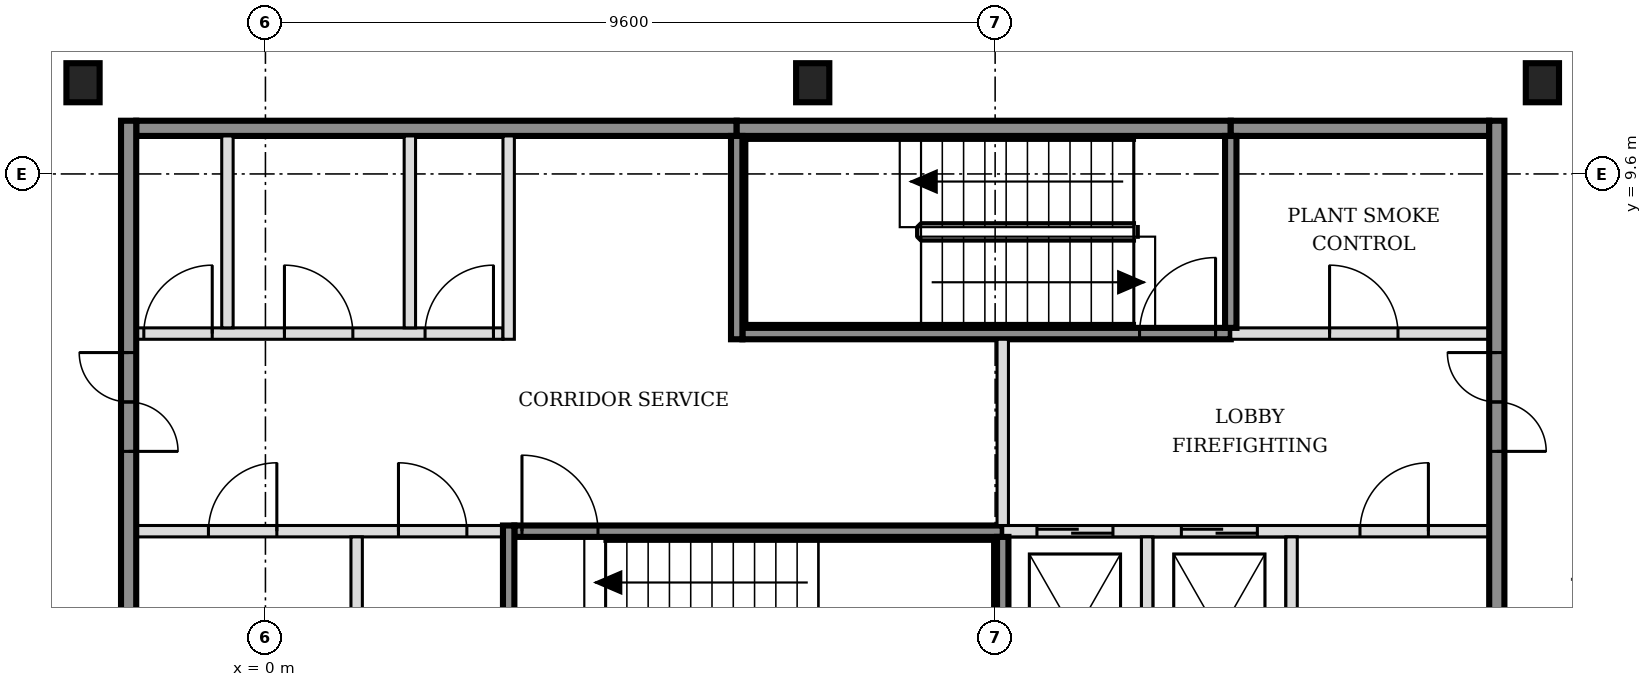
"""IFC4 building model, lengths in metres.
Left out: names, types, materials, properties, quantities, classifications, styles, units other than length and angle.
Written with IfcOpenShell. Run it as: python <this file> out.ifc"""

import sys

from ifc_helpers import new_model, si_unit, direction, frame, frame_2d, origin, origin_2d, place, context, subcontext, project, spatial, rectangle, i_section, extrude, element, fill, save


model = new_model("IFC4")
c1 = context("Model", 3, precision=1e-05, world=origin(), true_north=direction((0.0, 1.0)))
c2 = subcontext(c1, "Body", "Model", "MODEL_VIEW")
j1 = project(units=[si_unit("LENGTHUNIT", "METRE"), si_unit("PLANEANGLEUNIT", "RADIAN")], contexts=[c1])
p1 = place(None, origin())
s1 = spatial("IfcSite", under=j1, at=p1, CompositionType="ELEMENT")
p2 = place(p1, origin())
s2 = spatial("IfcBuilding", under=s1, at=p2, CompositionType="ELEMENT")
p3 = place(p2, frame((0.0, 0.0, 65.4)))
s3 = spatial("IfcBuildingStorey", under=s2, at=p3, CompositionType="ELEMENT", Elevation=65.4)
for number, where, z_axis, x_axis in (
    (1, (-2.4, 10.8, -0.15), (0.0, 0.0, 1.0), (1.0, 0.0, 0.0)),
    (2, (7.2, 10.8, -0.15), (0.0, 0.0, 1.0), (1.0, 0.0, 0.0)),
    (3, (16.8, 10.8, -0.15), (0.0, 0.0, 1.0), (1.0, 0.0, 0.0)),
):
    element("IfcColumn", number, at=place(p3, frame(where, z_axis=z_axis, x_axis=x_axis)), inside=s3, PredefinedType="COLUMN", context=c2, shape_type="SweptSolid", body=[
        extrude(i_section(OverallWidth=0.437, OverallDepth=0.514, WebThickness=0.061, FlangeThickness=0.097, FilletRadius=0.015, at=origin_2d()), origin(), (0.0, 0.0, 1.0), 3.6),
    ])
p4 = place(p3, frame((-1.7, 4.9, 0.0), z_axis=(0.0, 0.0, 1.0), x_axis=(1.0, 0.0, 0.0)))
e4 = element("IfcWall", 4, at=p4, inside=s3, PredefinedType="PARTITIONING", context=c2, shape_type="SweptSolid", body=[
    extrude(rectangle(XDim=4.825, YDim=0.15, at=frame_2d((2.413, 0.0))), origin(), (0.0, 0.0, 1.0), 3.45),
])
p5 = place(p4, frame((0.95, 0.0, 0.0)))
e5 = element("IfcOpeningElement", 5, at=p5, cuts=e4, PredefinedType="OPENING", context=c2, shape_type="SweptSolid", body=[
    extrude(rectangle(XDim=0.9, YDim=2.1, at=frame_2d((0.45, 1.05))), frame((0.0, 0.085, 0.0), z_axis=(0.0, -1.0, 0.0), x_axis=(1.0, 0.0, 0.0)), (0.0, 0.0, 1.0), 0.17),
])
p6 = place(p4, frame((3.45, 0.0, 0.0)))
e6 = element("IfcOpeningElement", 6, at=p6, cuts=e4, PredefinedType="OPENING", context=c2, shape_type="SweptSolid", body=[
    extrude(rectangle(XDim=0.9, YDim=2.1, at=frame_2d((0.45, 1.05))), frame((0.0, 0.085, 0.0), z_axis=(0.0, -1.0, 0.0), x_axis=(1.0, 0.0, 0.0)), (0.0, 0.0, 1.0), 0.17),
])
p7 = place(p3, frame((3.275, 4.9, 0.0), z_axis=(0.0, 0.0, 1.0), x_axis=(1.0, 0.0, 0.0)))
e7 = element("IfcWall", 7, at=p7, inside=s3, PredefinedType="SOLIDWALL", context=c2, shape_type="SweptSolid", body=[
    extrude(rectangle(XDim=6.425, YDim=0.15, at=frame_2d((3.212, 0.0))), origin(), (0.0, 0.0, 1.0), 3.45),
])
p8 = place(p7, frame((0.1, 0.0, 0.0)))
e8 = element("IfcOpeningElement", 8, at=p8, cuts=e7, PredefinedType="OPENING", context=c2, shape_type="SweptSolid", body=[
    extrude(rectangle(XDim=1.0, YDim=2.1, at=frame_2d((0.5, 1.05))), frame((0.0, 0.085, 0.0), z_axis=(0.0, -1.0, 0.0), x_axis=(1.0, 0.0, 0.0)), (0.0, 0.0, 1.0), 0.17),
])
p9 = place(p3, frame((9.7, 4.9, 0.0), z_axis=(0.0, 0.0, 1.0), x_axis=(1.0, 0.0, 0.0)))
e9 = element("IfcWall", 9, at=p9, inside=s3, PredefinedType="SOLIDWALL", context=c2, shape_type="SweptSolid", body=[
    extrude(rectangle(XDim=6.4, YDim=0.15, at=frame_2d((3.2, 0.0))), origin(), (0.0, 0.0, 1.0), 3.45),
])
p10 = place(p9, frame((0.45, 0.0, 0.0)))
e10 = element("IfcOpeningElement", 10, at=p10, cuts=e9, PredefinedType="OPENING", context=c2, shape_type="SweptSolid", body=[
    extrude(rectangle(XDim=1.0, YDim=2.1, at=frame_2d((0.5, 1.05))), frame((0.0, 0.085, 0.0), z_axis=(0.0, -1.0, 0.0), x_axis=(1.0, 0.0, 0.0)), (0.0, 0.0, 1.0), 0.17),
])
p11 = place(p9, frame((2.35, 0.0, 0.0)))
e11 = element("IfcOpeningElement", 11, at=p11, cuts=e9, PredefinedType="OPENING", context=c2, shape_type="SweptSolid", body=[
    extrude(rectangle(XDim=1.0, YDim=2.1, at=frame_2d((0.5, 1.05))), frame((0.0, 0.085, 0.0), z_axis=(0.0, -1.0, 0.0), x_axis=(1.0, 0.0, 0.0)), (0.0, 0.0, 1.0), 0.17),
])
p12 = place(p9, frame((4.7, 0.0, 0.0)))
e12 = element("IfcOpeningElement", 12, at=p12, cuts=e9, PredefinedType="OPENING", context=c2, shape_type="SweptSolid", body=[
    extrude(rectangle(XDim=0.9, YDim=2.1, at=frame_2d((0.45, 1.05))), frame((0.0, 0.085, 0.0), z_axis=(0.0, -1.0, 0.0), x_axis=(1.0, 0.0, 0.0)), (0.0, 0.0, 1.0), 0.17),
])
p13 = place(p3, frame((-1.7, 7.5, 0.0), z_axis=(0.0, 0.0, 1.0), x_axis=(1.0, 0.0, 0.0)))
e13 = element("IfcWall", 13, at=p13, inside=s3, PredefinedType="PARTITIONING", context=c2, shape_type="SweptSolid", body=[
    extrude(rectangle(XDim=4.825, YDim=0.15, at=frame_2d((2.413, 0.0))), origin(), (0.0, 0.0, 1.0), 3.45),
])
p14 = place(p13, frame((0.1, 0.0, 0.0)))
e14 = element("IfcOpeningElement", 14, at=p14, cuts=e13, PredefinedType="OPENING", context=c2, shape_type="SweptSolid", body=[
    extrude(rectangle(XDim=0.9, YDim=2.1, at=frame_2d((0.45, 1.05))), frame((0.0, 0.085, 0.0), z_axis=(0.0, -1.0, 0.0), x_axis=(1.0, 0.0, 0.0)), (0.0, 0.0, 1.0), 0.17),
])
p15 = place(p13, frame((1.95, 0.0, 0.0)))
e15 = element("IfcOpeningElement", 15, at=p15, cuts=e13, PredefinedType="OPENING", context=c2, shape_type="SweptSolid", body=[
    extrude(rectangle(XDim=0.9, YDim=2.1, at=frame_2d((0.45, 1.05))), frame((0.0, 0.085, 0.0), z_axis=(0.0, -1.0, 0.0), x_axis=(1.0, 0.0, 0.0)), (0.0, 0.0, 1.0), 0.17),
])
p16 = place(p13, frame((3.8, 0.0, 0.0)))
e16 = element("IfcOpeningElement", 16, at=p16, cuts=e13, PredefinedType="OPENING", context=c2, shape_type="SweptSolid", body=[
    extrude(rectangle(XDim=0.9, YDim=2.1, at=frame_2d((0.45, 1.05))), frame((0.0, 0.085, 0.0), z_axis=(0.0, -1.0, 0.0), x_axis=(1.0, 0.0, 0.0)), (0.0, 0.0, 1.0), 0.17),
])
p17 = place(p3, frame((6.275, 7.5, 0.0), z_axis=(0.0, 0.0, 1.0), x_axis=(1.0, 0.0, 0.0)))
e17 = element("IfcWall", 17, at=p17, inside=s3, PredefinedType="SOLIDWALL", context=c2, shape_type="SweptSolid", body=[
    extrude(rectangle(XDim=6.425, YDim=0.15, at=frame_2d((3.212, 0.0))), origin(), (0.0, 0.0, 1.0), 3.45),
])
p18 = place(p17, frame((5.225, 0.0, 0.0)))
e18 = element("IfcOpeningElement", 18, at=p18, cuts=e17, PredefinedType="OPENING", context=c2, shape_type="SweptSolid", body=[
    extrude(rectangle(XDim=1.0, YDim=2.1, at=frame_2d((0.5, 1.05))), frame((0.0, 0.085, 0.0), z_axis=(0.0, -1.0, 0.0), x_axis=(1.0, 0.0, 0.0)), (0.0, 0.0, 1.0), 0.17),
])
p19 = place(p3, frame((12.7, 7.5, 0.0), z_axis=(0.0, 0.0, 1.0), x_axis=(1.0, 0.0, 0.0)))
e19 = element("IfcWall", 19, at=p19, inside=s3, PredefinedType="SOLIDWALL", context=c2, shape_type="SweptSolid", body=[
    extrude(rectangle(XDim=3.4, YDim=0.15, at=frame_2d((1.7, 0.0))), origin(), (0.0, 0.0, 1.0), 3.45),
])
p20 = place(p19, frame((1.3, 0.0, 0.0)))
e20 = element("IfcOpeningElement", 20, at=p20, cuts=e19, PredefinedType="OPENING", context=c2, shape_type="SweptSolid", body=[
    extrude(rectangle(XDim=0.9, YDim=2.1, at=frame_2d((0.45, 1.05))), frame((0.0, 0.085, 0.0), z_axis=(0.0, -1.0, 0.0), x_axis=(1.0, 0.0, 0.0)), (0.0, 0.0, 1.0), 0.17),
])
p21 = place(p3, frame((-1.7, 10.2, 0.0), z_axis=(0.0, 0.0, 1.0), x_axis=(1.0, 0.0, 0.0)))
e21 = element("IfcWall", 21, at=p21, inside=s3, PredefinedType="SOLIDWALL", context=c2, shape_type="SweptSolid", body=[
    extrude(rectangle(XDim=7.9, YDim=0.2, at=frame_2d((3.95, 0.0))), origin(), (0.0, 0.0, 1.0), 3.45),
])
p22 = place(p3, frame((6.2, 10.2, 0.0), z_axis=(0.0, 0.0, 1.0), x_axis=(1.0, 0.0, 0.0)))
e22 = element("IfcWall", 22, at=p22, inside=s3, PredefinedType="SOLIDWALL", context=c2, shape_type="SweptSolid", body=[
    extrude(rectangle(XDim=6.5, YDim=0.2, at=frame_2d((3.25, 0.0))), origin(), (0.0, 0.0, 1.0), 3.45),
])
p23 = place(p3, frame((12.7, 10.2, 0.0), z_axis=(0.0, 0.0, 1.0), x_axis=(1.0, 0.0, 0.0)))
e23 = element("IfcWall", 23, at=p23, inside=s3, PredefinedType="SOLIDWALL", context=c2, shape_type="SweptSolid", body=[
    extrude(rectangle(XDim=3.4, YDim=0.2, at=frame_2d((1.7, 0.0))), origin(), (0.0, 0.0, 1.0), 3.45),
])
p24 = place(p3, frame((-1.8, -5.5, 0.0), z_axis=(0.0, 0.0, 1.0), x_axis=(0.0, 1.0, 0.0)))
e24 = element("IfcWall", 24, at=p24, inside=s3, PredefinedType="SOLIDWALL", context=c2, shape_type="SweptSolid", body=[
    extrude(rectangle(XDim=15.8, YDim=0.2, at=frame_2d((7.9, 0.0))), origin(), (0.0, 0.0, 1.0), 3.45),
])
p25 = place(p24, frame((3.05, 0.0, 0.0)))
e25 = element("IfcOpeningElement", 25, at=p25, cuts=e24, PredefinedType="OPENING", context=c2, shape_type="SweptSolid", body=[
    extrude(rectangle(XDim=1.3, YDim=2.1, at=frame_2d((0.65, 1.05))), frame((0.0, 0.11, 0.0), z_axis=(0.0, -1.0, 0.0), x_axis=(1.0, 0.0, 0.0)), (0.0, 0.0, 1.0), 0.22),
])
p26 = place(p24, frame((11.45, 0.0, 0.0)))
e26 = element("IfcOpeningElement", 26, at=p26, cuts=e24, PredefinedType="OPENING", context=c2, shape_type="SweptSolid", body=[
    extrude(rectangle(XDim=1.3, YDim=2.1, at=frame_2d((0.65, 1.05))), frame((0.0, 0.11, 0.0), z_axis=(0.0, -1.0, 0.0), x_axis=(1.0, 0.0, 0.0)), (0.0, 0.0, 1.0), 0.22),
])
p27 = place(p3, frame((-0.5, 7.575, 0.0), z_axis=(0.0, 0.0, 1.0), x_axis=(0.0, 1.0, 0.0)))
e27 = element("IfcWall", 27, at=p27, inside=s3, PredefinedType="PARTITIONING", context=c2, shape_type="SweptSolid", body=[
    extrude(rectangle(XDim=2.525, YDim=0.15, at=frame_2d((1.263, 0.0))), origin(), (0.0, 0.0, 1.0), 3.45),
])
p28 = place(p3, frame((1.2, 2.275, 0.0), z_axis=(0.0, 0.0, 1.0), x_axis=(0.0, 1.0, 0.0)))
e28 = element("IfcWall", 28, at=p28, inside=s3, PredefinedType="PARTITIONING", context=c2, shape_type="SweptSolid", body=[
    extrude(rectangle(XDim=2.55, YDim=0.15, at=frame_2d((1.275, 0.0))), origin(), (0.0, 0.0, 1.0), 3.45),
])
p29 = place(p3, frame((1.9, 7.575, 0.0), z_axis=(0.0, 0.0, 1.0), x_axis=(0.0, 1.0, 0.0)))
e29 = element("IfcWall", 29, at=p29, inside=s3, PredefinedType="PARTITIONING", context=c2, shape_type="SweptSolid", body=[
    extrude(rectangle(XDim=2.525, YDim=0.15, at=frame_2d((1.263, 0.0))), origin(), (0.0, 0.0, 1.0), 3.45),
])
p30 = place(p3, frame((3.2, 2.275, 0.0), z_axis=(0.0, 0.0, 1.0), x_axis=(0.0, 1.0, 0.0)))
e30 = element("IfcWall", 30, at=p30, inside=s3, PredefinedType="SOLIDWALL", context=c2, shape_type="SweptSolid", body=[
    extrude(rectangle(XDim=2.7, YDim=0.15, at=frame_2d((1.35, 0.0))), origin(), (0.0, 0.0, 1.0), 3.45),
])
p31 = place(p3, frame((3.2, 7.425, 0.0), z_axis=(0.0, 0.0, 1.0), x_axis=(0.0, 1.0, 0.0)))
e31 = element("IfcWall", 31, at=p31, inside=s3, PredefinedType="PARTITIONING", context=c2, shape_type="SweptSolid", body=[
    extrude(rectangle(XDim=2.675, YDim=0.15, at=frame_2d((1.337, 0.0))), origin(), (0.0, 0.0, 1.0), 3.45),
])
p32 = place(p3, frame((6.2, 7.425, 0.0), z_axis=(0.0, 0.0, 1.0), x_axis=(0.0, 1.0, 0.0)))
e32 = element("IfcWall", 32, at=p32, inside=s3, PredefinedType="SOLIDWALL", context=c2, shape_type="SweptSolid", body=[
    extrude(rectangle(XDim=2.675, YDim=0.15, at=frame_2d((1.337, 0.0))), origin(), (0.0, 0.0, 1.0), 3.45),
])
p33 = place(p3, frame((9.7, 2.275, 0.0), z_axis=(0.0, 0.0, 1.0), x_axis=(0.0, 1.0, 0.0)))
e33 = element("IfcWall", 33, at=p33, inside=s3, PredefinedType="SOLIDWALL", context=c2, shape_type="SweptSolid", body=[
    extrude(rectangle(XDim=2.55, YDim=0.15, at=frame_2d((1.275, 0.0))), origin(), (0.0, 0.0, 1.0), 3.45),
])
p34 = place(p3, frame((9.7, 4.975, 0.0), z_axis=(0.0, 0.0, 1.0), x_axis=(0.0, 1.0, 0.0)))
e34 = element("IfcWall", 34, at=p34, inside=s3, PredefinedType="SOLIDWALL", context=c2, shape_type="SweptSolid", body=[
    extrude(rectangle(XDim=2.45, YDim=0.15, at=frame_2d((1.225, 0.0))), origin(), (0.0, 0.0, 1.0), 3.45),
])
p35 = place(p3, frame((11.6, 2.275, 0.0), z_axis=(0.0, 0.0, 1.0), x_axis=(0.0, 1.0, 0.0)))
e35 = element("IfcWall", 35, at=p35, inside=s3, PredefinedType="SOLIDWALL", context=c2, shape_type="SweptSolid", body=[
    extrude(rectangle(XDim=2.55, YDim=0.15, at=frame_2d((1.275, 0.0))), origin(), (0.0, 0.0, 1.0), 3.45),
])
p36 = place(p3, frame((12.7, 7.575, 0.0), z_axis=(0.0, 0.0, 1.0), x_axis=(0.0, 1.0, 0.0)))
e36 = element("IfcWall", 36, at=p36, inside=s3, PredefinedType="SOLIDWALL", context=c2, shape_type="SweptSolid", body=[
    extrude(rectangle(XDim=2.525, YDim=0.15, at=frame_2d((1.263, 0.0))), origin(), (0.0, 0.0, 1.0), 3.45),
])
p37 = place(p3, frame((13.5, 2.275, 0.0), z_axis=(0.0, 0.0, 1.0), x_axis=(0.0, 1.0, 0.0)))
e37 = element("IfcWall", 37, at=p37, inside=s3, PredefinedType="SOLIDWALL", context=c2, shape_type="SweptSolid", body=[
    extrude(rectangle(XDim=2.55, YDim=0.15, at=frame_2d((1.275, 0.0))), origin(), (0.0, 0.0, 1.0), 3.45),
])
p38 = place(p3, frame((16.2, -5.5, 0.0), z_axis=(0.0, 0.0, 1.0), x_axis=(0.0, 1.0, 0.0)))
e38 = element("IfcWall", 38, at=p38, inside=s3, PredefinedType="SOLIDWALL", context=c2, shape_type="SweptSolid", body=[
    extrude(rectangle(XDim=15.8, YDim=0.2, at=frame_2d((7.9, 0.0))), origin(), (0.0, 0.0, 1.0), 3.45),
])
p39 = place(p38, frame((3.05, 0.0, 0.0)))
e39 = element("IfcOpeningElement", 39, at=p39, cuts=e38, PredefinedType="OPENING", context=c2, shape_type="SweptSolid", body=[
    extrude(rectangle(XDim=1.3, YDim=2.1, at=frame_2d((0.65, 1.05))), frame((0.0, 0.11, 0.0), z_axis=(0.0, -1.0, 0.0), x_axis=(1.0, 0.0, 0.0)), (0.0, 0.0, 1.0), 0.22),
])
p40 = place(p38, frame((11.45, 0.0, 0.0)))
e40 = element("IfcOpeningElement", 40, at=p40, cuts=e38, PredefinedType="OPENING", context=c2, shape_type="SweptSolid", body=[
    extrude(rectangle(XDim=1.3, YDim=2.1, at=frame_2d((0.65, 1.05))), frame((0.0, 0.11, 0.0), z_axis=(0.0, -1.0, 0.0), x_axis=(1.0, 0.0, 0.0)), (0.0, 0.0, 1.0), 0.22),
])
p41 = place(p10, origin())
e41 = element("IfcDoor", 41, at=p41, inside=s3, OperationType="DOUBLE_DOOR_SLIDING", PredefinedType="DOOR", context=c2, shape_type="SweptSolid", body=[
    extrude(rectangle(XDim=1.0, YDim=2.1, at=frame_2d((0.5, 1.05))), frame((0.0, 0.025, 0.0), z_axis=(0.0, -1.0, 0.0), x_axis=(1.0, 0.0, 0.0)), (0.0, 0.0, 1.0), 0.05),
])
fill(e10, e41)
p42 = place(p11, origin())
e42 = element("IfcDoor", 42, at=p42, inside=s3, OperationType="DOUBLE_DOOR_SLIDING", PredefinedType="DOOR", context=c2, shape_type="SweptSolid", body=[
    extrude(rectangle(XDim=1.0, YDim=2.1, at=frame_2d((0.5, 1.05))), frame((0.0, 0.025, 0.0), z_axis=(0.0, -1.0, 0.0), x_axis=(1.0, 0.0, 0.0)), (0.0, 0.0, 1.0), 0.05),
])
fill(e11, e42)
p43 = place(p8, origin())
e43 = element("IfcDoor", 43, at=p43, inside=s3, OperationType="SINGLE_SWING_LEFT", PredefinedType="DOOR", context=c2, shape_type="SweptSolid", body=[
    extrude(rectangle(XDim=1.0, YDim=2.1, at=frame_2d((0.5, 1.05))), frame((0.0, 0.025, 0.0), z_axis=(0.0, -1.0, 0.0), x_axis=(1.0, 0.0, 0.0)), (0.0, 0.0, 1.0), 0.05),
])
fill(e8, e43)
p44 = place(p18, origin())
e44 = element("IfcDoor", 44, at=p44, inside=s3, OperationType="SINGLE_SWING_RIGHT", PredefinedType="DOOR", context=c2, shape_type="SweptSolid", body=[
    extrude(rectangle(XDim=1.0, YDim=2.1, at=frame_2d((0.5, 1.05))), frame((0.0, 0.025, 0.0), z_axis=(0.0, -1.0, 0.0), x_axis=(1.0, 0.0, 0.0)), (0.0, 0.0, 1.0), 0.05),
])
fill(e18, e44)
p45 = place(p26, origin())
e45 = element("IfcDoor", 45, at=p45, inside=s3, OperationType="DOUBLE_DOOR_SINGLE_SWING", PredefinedType="DOOR", context=c2, shape_type="SweptSolid", body=[
    extrude(rectangle(XDim=1.3, YDim=2.1, at=frame_2d((0.65, 1.05))), frame((0.0, 0.025, 0.0), z_axis=(0.0, -1.0, 0.0), x_axis=(1.0, 0.0, 0.0)), (0.0, 0.0, 1.0), 0.05),
])
fill(e26, e45)
p46 = place(p40, origin())
e46 = element("IfcDoor", 46, at=p46, inside=s3, OperationType="DOUBLE_DOOR_SINGLE_SWING", PredefinedType="DOOR", context=c2, shape_type="SweptSolid", body=[
    extrude(rectangle(XDim=1.3, YDim=2.1, at=frame_2d((0.65, 1.05))), frame((0.0, 0.025, 0.0), z_axis=(0.0, -1.0, 0.0), x_axis=(1.0, 0.0, 0.0)), (0.0, 0.0, 1.0), 0.05),
])
fill(e40, e46)
p47 = place(p12, origin())
e47 = element("IfcDoor", 47, at=p47, inside=s3, OperationType="SINGLE_SWING_RIGHT", PredefinedType="DOOR", context=c2, shape_type="SweptSolid", body=[
    extrude(rectangle(XDim=0.9, YDim=2.1, at=frame_2d((0.45, 1.05))), frame((0.0, 0.025, 0.0), z_axis=(0.0, -1.0, 0.0), x_axis=(1.0, 0.0, 0.0)), (0.0, 0.0, 1.0), 0.05),
])
fill(e12, e47)
p48 = place(p20, origin())
e48 = element("IfcDoor", 48, at=p48, inside=s3, OperationType="SINGLE_SWING_LEFT", PredefinedType="DOOR", context=c2, shape_type="SweptSolid", body=[
    extrude(rectangle(XDim=0.9, YDim=2.1, at=frame_2d((0.45, 1.05))), frame((0.0, 0.025, 0.0), z_axis=(0.0, -1.0, 0.0), x_axis=(1.0, 0.0, 0.0)), (0.0, 0.0, 1.0), 0.05),
])
fill(e20, e48)
p49 = place(p5, origin())
e49 = element("IfcDoor", 49, at=p49, inside=s3, OperationType="SINGLE_SWING_RIGHT", PredefinedType="DOOR", context=c2, shape_type="SweptSolid", body=[
    extrude(rectangle(XDim=0.9, YDim=2.1, at=frame_2d((0.45, 1.05))), frame((0.0, 0.025, 0.0), z_axis=(0.0, -1.0, 0.0), x_axis=(1.0, 0.0, 0.0)), (0.0, 0.0, 1.0), 0.05),
])
fill(e5, e49)
p50 = place(p6, origin())
e50 = element("IfcDoor", 50, at=p50, inside=s3, OperationType="SINGLE_SWING_LEFT", PredefinedType="DOOR", context=c2, shape_type="SweptSolid", body=[
    extrude(rectangle(XDim=0.9, YDim=2.1, at=frame_2d((0.45, 1.05))), frame((0.0, 0.025, 0.0), z_axis=(0.0, -1.0, 0.0), x_axis=(1.0, 0.0, 0.0)), (0.0, 0.0, 1.0), 0.05),
])
fill(e6, e50)
p51 = place(p14, origin())
e51 = element("IfcDoor", 51, at=p51, inside=s3, OperationType="SINGLE_SWING_RIGHT", PredefinedType="DOOR", context=c2, shape_type="SweptSolid", body=[
    extrude(rectangle(XDim=0.9, YDim=2.1, at=frame_2d((0.45, 1.05))), frame((0.0, 0.025, 0.0), z_axis=(0.0, -1.0, 0.0), x_axis=(1.0, 0.0, 0.0)), (0.0, 0.0, 1.0), 0.05),
])
fill(e14, e51)
p52 = place(p15, origin())
e52 = element("IfcDoor", 52, at=p52, inside=s3, OperationType="SINGLE_SWING_LEFT", PredefinedType="DOOR", context=c2, shape_type="SweptSolid", body=[
    extrude(rectangle(XDim=0.9, YDim=2.1, at=frame_2d((0.45, 1.05))), frame((0.0, 0.025, 0.0), z_axis=(0.0, -1.0, 0.0), x_axis=(1.0, 0.0, 0.0)), (0.0, 0.0, 1.0), 0.05),
])
fill(e15, e52)
p53 = place(p16, origin())
e53 = element("IfcDoor", 53, at=p53, inside=s3, OperationType="SINGLE_SWING_RIGHT", PredefinedType="DOOR", context=c2, shape_type="SweptSolid", body=[
    extrude(rectangle(XDim=0.9, YDim=2.1, at=frame_2d((0.45, 1.05))), frame((0.0, 0.025, 0.0), z_axis=(0.0, -1.0, 0.0), x_axis=(1.0, 0.0, 0.0)), (0.0, 0.0, 1.0), 0.05),
])
fill(e16, e53)
save(model, sys.argv[1])
